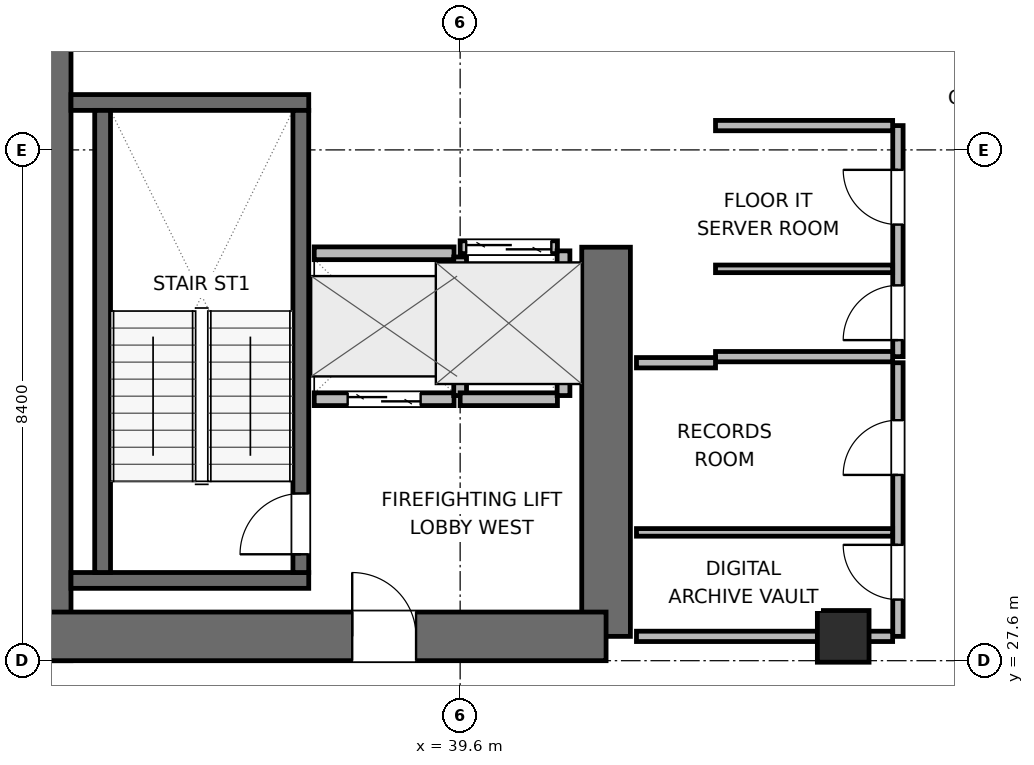
"""IFC4 building model, lengths in metres.
Left out: names, types, materials, properties, quantities, classifications, styles, units other than length and angle.
Written with IfcOpenShell. Run it as: python <this file> out.ifc"""

import sys

from ifc_helpers import new_model, si_unit, direction, frame, frame_2d, origin, origin_2d, place, context, subcontext, project, spatial, rectangle, extrude, element, fill, save


model = new_model("IFC4")
c1 = context("Model", 3, precision=1e-05, world=origin(), true_north=direction((0.0, 1.0)))
c2 = subcontext(c1, "Body", "Model", "MODEL_VIEW")
j1 = project(units=[si_unit("LENGTHUNIT", "METRE"), si_unit("PLANEANGLEUNIT", "RADIAN")], contexts=[c1])
p1 = place(None, origin())
s1 = spatial("IfcSite", under=j1, at=p1, CompositionType="ELEMENT")
p2 = place(p1, origin())
s2 = spatial("IfcBuilding", under=s1, at=p2, CompositionType="ELEMENT")
p3 = place(p2, frame((0.0, 0.0, 170.1)))
s3 = spatial("IfcBuildingStorey", under=s2, at=p3, CompositionType="ELEMENT", Elevation=170.1)
p4 = place(p3, frame((32.8, 27.6, 0.0), z_axis=(0.0, 0.0, 1.0), x_axis=(0.0, 1.0, 0.0)))
e1 = element("IfcWall", 1, at=p4, inside=s3, PredefinedType="SHEAR", context=c2, shape_type="SweptSolid", body=[
    extrude(rectangle(XDim=16.8, YDim=0.8, at=frame_2d((8.4, 0.0))), origin(), (0.0, 0.0, 1.0), 3.9),
])
p5 = place(p3, frame((42.0, 28.0, 0.0), z_axis=(0.0, 0.0, 1.0), x_axis=(0.0, 1.0, 0.0)))
e2 = element("IfcWall", 2, at=p5, inside=s3, PredefinedType="SHEAR", context=c2, shape_type="SweptSolid", body=[
    extrude(rectangle(XDim=6.4, YDim=0.8, at=frame_2d((3.2, 0.0))), origin(), (0.0, 0.0, 1.0), 3.9),
])
p6 = place(p3, frame((32.8, 28.0, 0.0), z_axis=(0.0, 0.0, 1.0), x_axis=(1.0, 0.0, 0.0)))
e3 = element("IfcWall", 3, at=p6, inside=s3, PredefinedType="SHEAR", context=c2, shape_type="SweptSolid", body=[
    extrude(rectangle(XDim=9.2, YDim=0.8, at=frame_2d((4.6, 0.0))), origin(), (0.0, 0.0, 1.0), 3.9),
])
p7 = place(p6, frame((5.025, 0.0, 0.0)))
e4 = element("IfcOpeningElement", 4, at=p7, cuts=e3, PredefinedType="OPENING", context=c2, shape_type="SweptSolid", body=[
    extrude(rectangle(XDim=1.05, YDim=2.04, at=frame_2d((0.525, 1.02))), frame((0.0, 0.41, 0.0), z_axis=(0.0, -1.0, 0.0), x_axis=(1.0, 0.0, 0.0)), (0.0, 0.0, 1.0), 0.82),
])
for number, where, z_axis, x_axis in (
    (5, (33.2, 28.92, 0.0), (0.0, 0.0, 1.0), (1.0, 0.0, 0.0)),
    (6, (33.2, 36.78, 0.0), (0.0, 0.0, 1.0), (1.0, 0.0, 0.0)),
):
    element("IfcWall", number, at=place(p3, frame(where, z_axis=z_axis, x_axis=x_axis)), inside=s3, PredefinedType="SHEAR", context=c2, shape_type="SweptSolid", body=[
        extrude(rectangle(XDim=3.91, YDim=0.26, at=frame_2d((1.955, 0.0))), origin(), (0.0, 0.0, 1.0), 3.9),
    ])
p8 = place(p3, frame((33.72, 29.05, 0.0), z_axis=(0.0, 0.0, 1.0), x_axis=(0.0, 1.0, 0.0)))
e7 = element("IfcWall", 7, at=p8, inside=s3, PredefinedType="SHEAR", context=c2, shape_type="SweptSolid", body=[
    extrude(rectangle(XDim=7.6, YDim=0.26, at=frame_2d((3.8, 0.0))), origin(), (0.0, 0.0, 1.0), 3.9),
])
p9 = place(p3, frame((36.98, 29.05, 0.0), z_axis=(0.0, 0.0, 1.0), x_axis=(0.0, 1.0, 0.0)))
e8 = element("IfcWall", 8, at=p9, inside=s3, PredefinedType="SHEAR", context=c2, shape_type="SweptSolid", body=[
    extrude(rectangle(XDim=7.6, YDim=0.26, at=frame_2d((3.8, 0.0))), origin(), (0.0, 0.0, 1.0), 3.9),
])
p10 = place(p9, frame((0.3, 0.0, 0.0)))
e9 = element("IfcOpeningElement", 9, at=p10, cuts=e8, PredefinedType="OPENING", context=c2, shape_type="SweptSolid", body=[
    extrude(rectangle(XDim=1.0, YDim=2.04, at=frame_2d((0.5, 1.02))), frame((0.0, 0.14, 0.0), z_axis=(0.0, -1.0, 0.0), x_axis=(1.0, 0.0, 0.0)), (0.0, 0.0, 1.0), 0.28),
])
p11 = place(p3, frame((45.9, 28.0, 0.0), z_axis=(0.0, 0.0, 1.0), x_axis=(1.0, 0.0, 0.0)))
e10 = element("IfcColumn", 10, at=p11, inside=s3, PredefinedType="COLUMN", context=c2, shape_type="SweptSolid", body=[
    extrude(rectangle(XDim=0.85, YDim=0.85, at=origin_2d()), origin(), (0.0, 0.0, 1.0), 3.9),
])
p12 = place(p3, frame((37.2, 31.9, 0.0), z_axis=(0.0, 0.0, 1.0), x_axis=(1.0, 0.0, 0.0)))
e11 = element("IfcWall", 11, at=p12, inside=s3, PredefinedType="PARTITIONING", context=c2, shape_type="SweptSolid", body=[
    extrude(rectangle(XDim=2.3, YDim=0.21, at=frame_2d((1.15, 0.0))), origin(), (0.0, 0.0, 1.0), 3.68),
])
p13 = place(p12, frame((0.55, 0.0, 0.0)))
e12 = element("IfcOpeningElement", 12, at=p13, cuts=e11, PredefinedType="OPENING", context=c2, shape_type="SweptSolid", body=[
    extrude(rectangle(XDim=1.2, YDim=2.04, at=frame_2d((0.6, 1.02))), frame((0.0, 0.115, 0.0), z_axis=(0.0, -1.0, 0.0), x_axis=(1.0, 0.0, 0.0)), (0.0, 0.0, 1.0), 0.23),
])
p14 = place(p3, frame((37.2, 34.3, 0.0), z_axis=(0.0, 0.0, 1.0), x_axis=(1.0, 0.0, 0.0)))
e13 = element("IfcWall", 13, at=p14, inside=s3, PredefinedType="PARTITIONING", context=c2, shape_type="SweptSolid", body=[
    extrude(rectangle(XDim=2.3, YDim=0.21, at=frame_2d((1.15, 0.0))), origin(), (0.0, 0.0, 1.0), 3.68),
])
p15 = place(p3, frame((39.6, 31.96, 0.0), z_axis=(0.0, 0.0, 1.0), x_axis=(0.0, 1.0, 0.0)))
e14 = element("IfcWall", 14, at=p15, inside=s3, PredefinedType="PARTITIONING", context=c2, shape_type="SweptSolid", body=[
    extrude(rectangle(XDim=2.28, YDim=0.21, at=frame_2d((1.14, 0.0))), origin(), (0.0, 0.0, 1.0), 3.68),
])
p16 = place(p3, frame((39.6, 34.4, 0.0), z_axis=(0.0, 0.0, 1.0), x_axis=(1.0, 0.0, 0.0)))
e15 = element("IfcWall", 15, at=p16, inside=s3, PredefinedType="PARTITIONING", context=c2, shape_type="SweptSolid", body=[
    extrude(rectangle(XDim=1.6, YDim=0.21, at=frame_2d((0.8, 0.0))), origin(), (0.0, 0.0, 1.0), 3.68),
])
p17 = place(p16, frame((0.1, 0.0, 0.0)))
e16 = element("IfcOpeningElement", 16, at=p17, cuts=e15, PredefinedType="OPENING", context=c2, shape_type="SweptSolid", body=[
    extrude(rectangle(XDim=1.4, YDim=2.06, at=frame_2d((0.7, 1.03))), frame((0.0, 0.115, 0.0), z_axis=(0.0, -1.0, 0.0), x_axis=(1.0, 0.0, 0.0)), (0.0, 0.0, 1.0), 0.23),
])
p18 = place(p3, frame((39.6, 31.9, 0.0), z_axis=(0.0, 0.0, 1.0), x_axis=(1.0, 0.0, 0.0)))
e17 = element("IfcWall", 17, at=p18, inside=s3, PredefinedType="PARTITIONING", context=c2, shape_type="SweptSolid", body=[
    extrude(rectangle(XDim=1.6, YDim=0.21, at=frame_2d((0.8, 0.0))), origin(), (0.0, 0.0, 1.0), 3.68),
])
p19 = place(p3, frame((41.3, 31.96, 0.0), z_axis=(0.0, 0.0, 1.0), x_axis=(0.0, 1.0, 0.0)))
e18 = element("IfcWall", 18, at=p19, inside=s3, PredefinedType="PARTITIONING", context=c2, shape_type="SweptSolid", body=[
    extrude(rectangle(XDim=2.38, YDim=0.21, at=frame_2d((1.19, 0.0))), origin(), (0.0, 0.0, 1.0), 3.68),
])
p20 = place(p3, frame((46.8, 32.6, 0.0), z_axis=(0.0, 0.0, 1.0), x_axis=(0.0, 1.0, 0.0)))
e19 = element("IfcWall", 19, at=p20, inside=s3, PredefinedType="PARTITIONING", context=c2, shape_type="SweptSolid", body=[
    extrude(rectangle(XDim=3.8, YDim=0.17, at=frame_2d((1.9, 0.0))), origin(), (0.0, 0.0, 1.0), 3.68),
])
p21 = place(p20, frame((0.272, 0.0, 0.0)))
e20 = element("IfcOpeningElement", 20, at=p21, cuts=e19, PredefinedType="OPENING", context=c2, shape_type="SweptSolid", body=[
    extrude(rectangle(XDim=0.9, YDim=2.02, at=frame_2d((0.45, 1.01))), frame((0.0, 0.095, 0.0), z_axis=(0.0, -1.0, 0.0), x_axis=(1.0, 0.0, 0.0)), (0.0, 0.0, 1.0), 0.19),
])
p22 = place(p20, frame((2.172, 0.0, 0.0)))
e21 = element("IfcOpeningElement", 21, at=p22, cuts=e19, PredefinedType="OPENING", context=c2, shape_type="SweptSolid", body=[
    extrude(rectangle(XDim=0.9, YDim=2.02, at=frame_2d((0.45, 1.01))), frame((0.0, 0.095, 0.0), z_axis=(0.0, -1.0, 0.0), x_axis=(1.0, 0.0, 0.0)), (0.0, 0.0, 1.0), 0.19),
])
for number, where, z_axis, x_axis in (
    (22, (43.8, 32.6, 0.0), (0.0, 0.0, 1.0), (1.0, 0.0, 0.0)),
    (23, (43.8, 36.4, 0.0), (0.0, 0.0, 1.0), (1.0, 0.0, 0.0)),
):
    element("IfcWall", number, at=place(p3, frame(where, z_axis=z_axis, x_axis=x_axis)), inside=s3, PredefinedType="PARTITIONING", context=c2, shape_type="SweptSolid", body=[
        extrude(rectangle(XDim=2.913, YDim=0.17, at=frame_2d((1.457, 0.0))), origin(), (0.0, 0.0, 1.0), 3.68),
    ])
p23 = place(p3, frame((43.8, 34.044, 0.0), z_axis=(0.0, 0.0, 1.0), x_axis=(1.0, 0.0, 0.0)))
e24 = element("IfcWall", 24, at=p23, inside=s3, PredefinedType="PARTITIONING", context=c2, shape_type="SweptSolid", body=[
    extrude(rectangle(XDim=2.913, YDim=0.125, at=frame_2d((1.457, 0.0))), origin(), (0.0, 0.0, 1.0), 3.68),
])
p24 = place(p3, frame((46.8, 28.0, 0.0), z_axis=(0.0, 0.0, 1.0), x_axis=(0.0, 1.0, 0.0)))
e25 = element("IfcWall", 25, at=p24, inside=s3, PredefinedType="PARTITIONING", context=c2, shape_type="SweptSolid", body=[
    extrude(rectangle(XDim=4.5, YDim=0.17, at=frame_2d((2.25, 0.0))), origin(), (0.0, 0.0, 1.0), 3.68),
])
p25 = place(p24, frame((0.605, 0.0, 0.0)))
e26 = element("IfcOpeningElement", 26, at=p25, cuts=e25, PredefinedType="OPENING", context=c2, shape_type="SweptSolid", body=[
    extrude(rectangle(XDim=0.9, YDim=2.02, at=frame_2d((0.45, 1.01))), frame((0.0, 0.095, 0.0), z_axis=(0.0, -1.0, 0.0), x_axis=(1.0, 0.0, 0.0)), (0.0, 0.0, 1.0), 0.19),
])
p26 = place(p24, frame((2.655, 0.0, 0.0)))
e27 = element("IfcOpeningElement", 27, at=p26, cuts=e25, PredefinedType="OPENING", context=c2, shape_type="SweptSolid", body=[
    extrude(rectangle(XDim=0.9, YDim=2.02, at=frame_2d((0.45, 1.01))), frame((0.0, 0.095, 0.0), z_axis=(0.0, -1.0, 0.0), x_axis=(1.0, 0.0, 0.0)), (0.0, 0.0, 1.0), 0.19),
])
p27 = place(p3, frame((42.5, 28.0, 0.0), z_axis=(0.0, 0.0, 1.0), x_axis=(1.0, 0.0, 0.0)))
e28 = element("IfcWall", 28, at=p27, inside=s3, PredefinedType="PARTITIONING", context=c2, shape_type="SweptSolid", body=[
    extrude(rectangle(XDim=4.213, YDim=0.17, at=frame_2d((2.106, 0.0))), origin(), (0.0, 0.0, 1.0), 2.765),
])
p28 = place(p3, frame((42.5, 32.5, 0.0), z_axis=(0.0, 0.0, 1.0), x_axis=(1.0, 0.0, 0.0)))
e29 = element("IfcWall", 29, at=p28, inside=s3, PredefinedType="PARTITIONING", context=c2, shape_type="SweptSolid", body=[
    extrude(rectangle(XDim=1.3, YDim=0.17, at=frame_2d((0.65, 0.0))), origin(), (0.0, 0.0, 1.0), 3.68),
])
p29 = place(p3, frame((42.5, 29.71, 0.0), z_axis=(0.0, 0.0, 1.0), x_axis=(1.0, 0.0, 0.0)))
e30 = element("IfcWall", 30, at=p29, inside=s3, PredefinedType="PARTITIONING", context=c2, shape_type="SweptSolid", body=[
    extrude(rectangle(XDim=4.213, YDim=0.125, at=frame_2d((2.106, 0.0))), origin(), (0.0, 0.0, 1.0), 3.68),
])
p30 = place(p10, origin())
e31 = element("IfcDoor", 31, at=p30, inside=s3, OperationType="SINGLE_SWING_LEFT", PredefinedType="DOOR", context=c2, shape_type="SweptSolid", body=[
    extrude(rectangle(XDim=1.0, YDim=2.04, at=frame_2d((0.5, 1.02))), frame((0.0, 0.025, 0.0), z_axis=(0.0, -1.0, 0.0), x_axis=(1.0, 0.0, 0.0)), (0.0, 0.0, 1.0), 0.05),
])
fill(e9, e31)
p31 = place(p13, origin())
e32 = element("IfcDoor", 32, at=p31, inside=s3, OperationType="DOUBLE_DOOR_SLIDING", PredefinedType="DOOR", context=c2, shape_type="SweptSolid", body=[
    extrude(rectangle(XDim=1.2, YDim=2.04, at=frame_2d((0.6, 1.02))), frame((0.0, 0.025, 0.0), z_axis=(0.0, -1.0, 0.0), x_axis=(1.0, 0.0, 0.0)), (0.0, 0.0, 1.0), 0.05),
])
fill(e12, e32)
p32 = place(p17, origin())
e33 = element("IfcDoor", 33, at=p32, inside=s3, OperationType="DOUBLE_DOOR_SLIDING", PredefinedType="DOOR", context=c2, shape_type="SweptSolid", body=[
    extrude(rectangle(XDim=1.4, YDim=2.06, at=frame_2d((0.7, 1.03))), frame((0.0, 0.025, 0.0), z_axis=(0.0, -1.0, 0.0), x_axis=(1.0, 0.0, 0.0)), (0.0, 0.0, 1.0), 0.05),
])
fill(e16, e33)
p33 = place(p7, origin())
e34 = element("IfcDoor", 34, at=p33, inside=s3, OperationType="SINGLE_SWING_LEFT", PredefinedType="DOOR", context=c2, shape_type="SweptSolid", body=[
    extrude(rectangle(XDim=1.05, YDim=2.04, at=frame_2d((0.525, 1.02))), frame((0.0, 0.025, 0.0), z_axis=(0.0, -1.0, 0.0), x_axis=(1.0, 0.0, 0.0)), (0.0, 0.0, 1.0), 0.05),
])
fill(e4, e34)
p34 = place(p21, origin())
e35 = element("IfcDoor", 35, at=p34, inside=s3, OperationType="SINGLE_SWING_LEFT", PredefinedType="DOOR", context=c2, shape_type="SweptSolid", body=[
    extrude(rectangle(XDim=0.9, YDim=2.02, at=frame_2d((0.45, 1.01))), frame((0.0, 0.025, 0.0), z_axis=(0.0, -1.0, 0.0), x_axis=(1.0, 0.0, 0.0)), (0.0, 0.0, 1.0), 0.05),
])
fill(e20, e35)
p35 = place(p22, origin())
e36 = element("IfcDoor", 36, at=p35, inside=s3, OperationType="SINGLE_SWING_RIGHT", PredefinedType="DOOR", context=c2, shape_type="SweptSolid", body=[
    extrude(rectangle(XDim=0.9, YDim=2.02, at=frame_2d((0.45, 1.01))), frame((0.0, 0.025, 0.0), z_axis=(0.0, -1.0, 0.0), x_axis=(1.0, 0.0, 0.0)), (0.0, 0.0, 1.0), 0.05),
])
fill(e21, e36)
p36 = place(p25, origin())
e37 = element("IfcDoor", 37, at=p36, inside=s3, OperationType="SINGLE_SWING_RIGHT", PredefinedType="DOOR", context=c2, shape_type="SweptSolid", body=[
    extrude(rectangle(XDim=0.9, YDim=2.02, at=frame_2d((0.45, 1.01))), frame((0.0, 0.025, 0.0), z_axis=(0.0, -1.0, 0.0), x_axis=(1.0, 0.0, 0.0)), (0.0, 0.0, 1.0), 0.05),
])
fill(e26, e37)
p37 = place(p26, origin())
e38 = element("IfcDoor", 38, at=p37, inside=s3, OperationType="SINGLE_SWING_LEFT", PredefinedType="DOOR", context=c2, shape_type="SweptSolid", body=[
    extrude(rectangle(XDim=0.9, YDim=2.02, at=frame_2d((0.45, 1.01))), frame((0.0, 0.025, 0.0), z_axis=(0.0, -1.0, 0.0), x_axis=(1.0, 0.0, 0.0)), (0.0, 0.0, 1.0), 0.05),
])
fill(e27, e38)
save(model, sys.argv[1])
